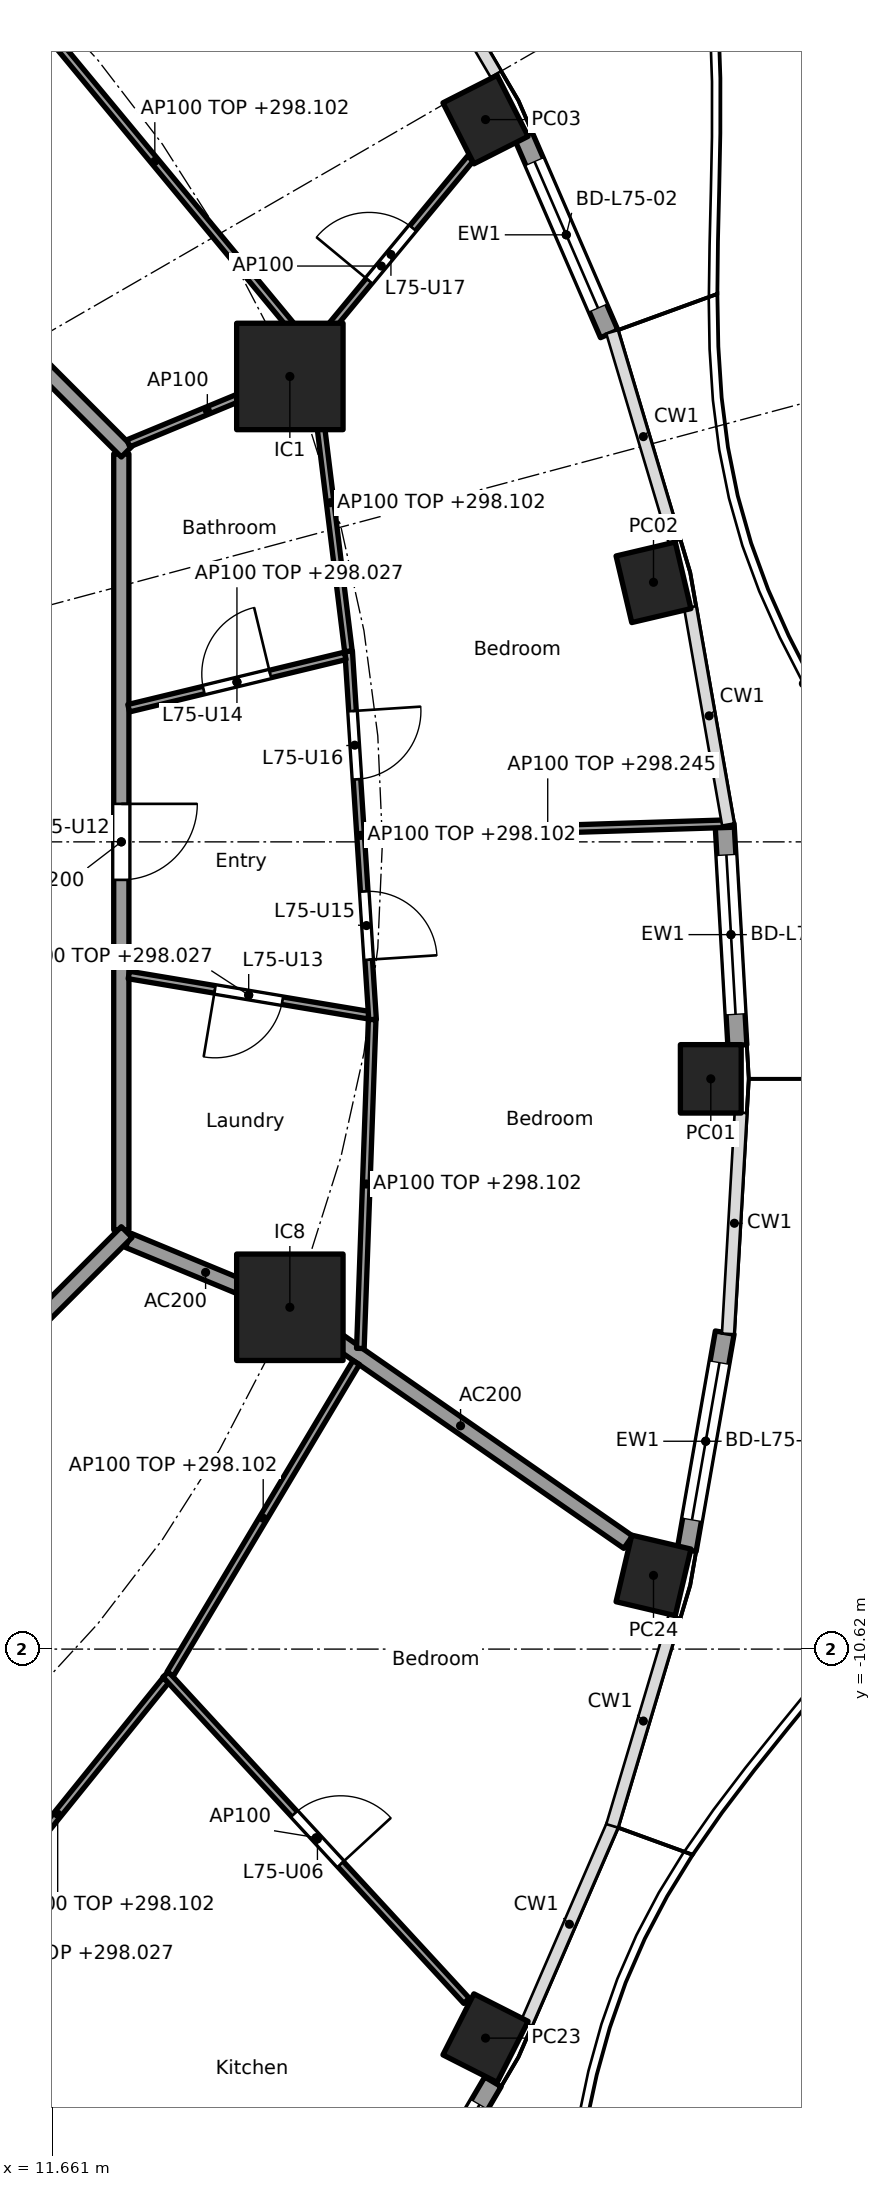
"""IFC4 building model, lengths in metres.
Left out: names, types, materials, properties, quantities, classifications, styles, units other than length and angle.
Written with IfcOpenShell. Run it as: python <this file> out.ifc"""

import sys

from ifc_helpers import new_model, si_unit, direction, frame, frame_2d, origin, origin_2d, place, context, subcontext, project, spatial, rectangle, hollow_rectangle, extrude, element, fill, save


model = new_model("IFC4")
c1 = context("Model", 3, precision=1e-05, world=origin(), true_north=direction((0.0, 1.0)))
c2 = subcontext(c1, "Body", "Model", "MODEL_VIEW")
j1 = project(units=[si_unit("LENGTHUNIT", "METRE"), si_unit("PLANEANGLEUNIT", "RADIAN")], contexts=[c1])
p1 = place(None, origin())
s1 = spatial("IfcSite", under=j1, at=p1, CompositionType="ELEMENT")
p2 = place(p1, origin())
s2 = spatial("IfcBuilding", under=s1, at=p2, CompositionType="ELEMENT")
p3 = place(p2, frame((0.0, 0.0, 295.5)))
s3 = spatial("IfcBuildingStorey", under=s2, at=p3, CompositionType="ELEMENT", Elevation=295.5)
for number, where, z_axis, x_axis in (
    (1, (20.32, -3.118, 0.0), (0.0, 0.0, 1.0), (0.0, 1.0, 0.0)),
    (2, (19.566, 3.415, 0.0), (0.0, 0.0, 1.0), (-0.229, 0.973, 0.0)),
    (3, (17.356, 9.502, 0.0), (0.0, 0.0, 1.0), (-0.452, 0.892, 0.0)),
    (4, (17.356, -15.738, 0.0), (0.0, 0.0, 1.0), (0.452, 0.892, 0.0)),
    (5, (19.566, -9.65, 0.0), (0.0, 0.0, 1.0), (0.229, 0.973, 0.0)),
):
    element("IfcColumn", number, at=place(p3, frame(where, z_axis=z_axis, x_axis=x_axis)), inside=s3, PredefinedType="COLUMN", context=c2, shape_type="SweptSolid", body=[
        extrude(hollow_rectangle(XDim=0.9, YDim=0.8, WallThickness=0.028, at=origin_2d()), origin(), (0.0, 0.0, 1.0), 3.7),
    ])
for number, where, z_axis, x_axis in (
    (6, (14.782, 6.123, 0.0), (0.0, 0.0, 1.0), (1.0, 0.0, 0.0)),
    (7, (14.782, -6.123, 0.0), (0.0, 0.0, 1.0), (1.0, 0.0, 0.0)),
):
    element("IfcColumn", number, at=place(p3, frame(where, z_axis=z_axis, x_axis=x_axis)), inside=s3, PredefinedType="COLUMN", context=c2, shape_type="SweptSolid", body=[
        extrude(rectangle(XDim=1.4, YDim=1.4, at=origin_2d()), origin(), (0.0, 0.0, 1.0), 3.7),
    ])
p4 = place(p3, frame((20.502, 0.235, 0.0), z_axis=(0.0, 0.0, 1.0), x_axis=(0.057533933376, -0.998343551344, 0.0)))
e8 = element("IfcWall", 8, at=p4, inside=s3, PredefinedType="SOLIDWALL", context=c2, shape_type="SweptSolid", body=[
    extrude(rectangle(XDim=2.915, YDim=0.25, at=frame_2d((1.458, 0.0))), origin(), (0.0, 0.0, 1.0), 3.28),
])
p5 = place(p4, frame((0.408, 0.0, 0.0)))
e9 = element("IfcOpeningElement", 9, at=p5, cuts=e8, PredefinedType="OPENING", context=c2, shape_type="SweptSolid", body=[
    extrude(rectangle(XDim=2.1, YDim=2.4, at=frame_2d((1.05, 1.2))), frame((0.0, 0.135, 0.0), z_axis=(0.0, -1.0, 0.0), x_axis=(1.0, 0.0, 0.0)), (0.0, 0.0, 1.0), 0.27),
])
p6 = place(p3, frame((17.854, 9.29, 0.0), z_axis=(0.0, 0.0, 1.0), x_axis=(0.397597791596, -0.9175598052, 0.0)))
e10 = element("IfcWall", 10, at=p6, inside=s3, PredefinedType="SOLIDWALL", context=c2, shape_type="SweptSolid", body=[
    extrude(rectangle(XDim=2.841, YDim=0.25, at=frame_2d((1.42, 0.0))), origin(), (0.0, 0.0, 1.0), 3.28),
])
p7 = place(p6, frame((0.371, 0.0, 0.0)))
e11 = element("IfcOpeningElement", 11, at=p7, cuts=e10, PredefinedType="OPENING", context=c2, shape_type="SweptSolid", body=[
    extrude(rectangle(XDim=2.1, YDim=2.4, at=frame_2d((1.05, 1.2))), frame((0.0, 0.135, 0.0), z_axis=(0.0, -1.0, 0.0), x_axis=(1.0, 0.0, 0.0)), (0.0, 0.0, 1.0), 0.27),
])
p8 = place(p3, frame((17.454, -16.312, 0.0), z_axis=(0.0, 0.0, 1.0), x_axis=(-0.506371364425, -0.862315511452, 0.0)))
e12 = element("IfcWall", 12, at=p8, inside=s3, PredefinedType="SOLIDWALL", context=c2, shape_type="SweptSolid", body=[
    extrude(rectangle(XDim=2.796, YDim=0.25, at=frame_2d((1.398, 0.0))), origin(), (0.0, 0.0, 1.0), 3.28),
])
p9 = place(p8, frame((0.348, 0.0, 0.0)))
e13 = element("IfcOpeningElement", 13, at=p9, cuts=e12, PredefinedType="OPENING", context=c2, shape_type="SweptSolid", body=[
    extrude(rectangle(XDim=2.1, YDim=2.4, at=frame_2d((1.05, 1.2))), frame((0.0, 0.135, 0.0), z_axis=(0.0, -1.0, 0.0), x_axis=(1.0, 0.0, 0.0)), (0.0, 0.0, 1.0), 0.27),
])
p10 = place(p3, frame((20.503, -6.456, 0.0), z_axis=(0.0, 0.0, 1.0), x_axis=(-0.172182411767, -0.985065082661, 0.0)))
e14 = element("IfcWall", 14, at=p10, inside=s3, PredefinedType="SOLIDWALL", context=c2, shape_type="SweptSolid", body=[
    extrude(rectangle(XDim=2.903, YDim=0.25, at=frame_2d((1.451, 0.0))), origin(), (0.0, 0.0, 1.0), 3.28),
])
p11 = place(p10, frame((0.401, 0.0, 0.0)))
e15 = element("IfcOpeningElement", 15, at=p11, cuts=e14, PredefinedType="OPENING", context=c2, shape_type="SweptSolid", body=[
    extrude(rectangle(XDim=2.1, YDim=2.4, at=frame_2d((1.05, 1.2))), frame((0.0, 0.135, 0.0), z_axis=(0.0, -1.0, 0.0), x_axis=(1.0, 0.0, 0.0)), (0.0, 0.0, 1.0), 0.27),
])
p12 = place(p3, frame((12.657, -5.243, 0.0), z_axis=(0.0, 0.0, 1.0), x_axis=(0.92383017907, -0.382802560388, 0.0)))
e16 = element("IfcWall", 16, at=p12, inside=s3, PredefinedType="PARTITIONING", context=c2, shape_type="SweptSolid", body=[
    extrude(rectangle(XDim=2.2, YDim=0.2, at=frame_2d((1.1, 0.0))), origin(), (0.0, 0.0, 1.0), 3.28),
])
p13 = place(p3, frame((14.823, -6.151, 0.0), z_axis=(0.0, 0.0, 1.0), x_axis=(0.821435065081, -0.570302054928, 0.0)))
e17 = element("IfcWall", 17, at=p13, inside=s3, PredefinedType="PARTITIONING", context=c2, shape_type="SweptSolid", body=[
    extrude(rectangle(XDim=5.368, YDim=0.2, at=frame_2d((2.684, 0.0))), origin(), (0.0, 0.0, 1.0), 3.28),
])
p14 = place(p3, frame((12.565, -5.104, 0.0), z_axis=(0.0, 0.0, 1.0), x_axis=(0.0, 1.0, 0.0)))
e18 = element("IfcWall", 18, at=p14, inside=s3, PredefinedType="PARTITIONING", context=c2, shape_type="SweptSolid", body=[
    extrude(rectangle(XDim=10.209, YDim=0.2, at=frame_2d((5.104, 0.0))), origin(), (0.0, 0.0, 1.0), 3.28),
])
p15 = place(p14, frame((4.604, 0.0, 0.0)))
e19 = element("IfcOpeningElement", 19, at=p15, cuts=e18, PredefinedType="OPENING", context=c2, shape_type="SweptSolid", body=[
    extrude(rectangle(XDim=1.0, YDim=2.1, at=frame_2d((0.5, 1.05))), frame((0.0, 0.11, 0.0), z_axis=(0.0, -1.0, 0.0), x_axis=(1.0, 0.0, 0.0)), (0.0, 0.0, 1.0), 0.22),
])
p16 = place(p3, frame((12.635, 5.134, 0.0), z_axis=(0.0, 0.0, 1.0), x_axis=(-0.707106781187, 0.707106781187, 0.0)))
e20 = element("IfcWall", 20, at=p16, inside=s3, PredefinedType="PARTITIONING", context=c2, shape_type="SweptSolid", body=[
    extrude(rectangle(XDim=10.609, YDim=0.2, at=frame_2d((5.305, 0.0))), origin(), (0.0, 0.0, 1.0), 3.28),
])
p17 = place(p3, frame((5.275, -12.494, 0.0), z_axis=(0.0, 0.0, 1.0), x_axis=(0.707106781187, 0.707106781187, 0.0)))
e21 = element("IfcWall", 21, at=p17, inside=s3, PredefinedType="PARTITIONING", context=c2, shape_type="SweptSolid", body=[
    extrude(rectangle(XDim=10.409, YDim=0.2, at=frame_2d((5.205, 0.0))), origin(), (0.0, 0.0, 1.0), 3.28),
])
p18 = place(p17, frame((1.185, 0.0, 0.0)))
e22 = element("IfcOpeningElement", 22, at=p18, cuts=e21, PredefinedType="OPENING", context=c2, shape_type="SweptSolid", body=[
    extrude(rectangle(XDim=1.0, YDim=2.1, at=frame_2d((0.5, 1.05))), frame((0.0, 0.11, 0.0), z_axis=(0.0, -1.0, 0.0), x_axis=(1.0, 0.0, 0.0)), (0.0, 0.0, 1.0), 0.22),
])
p19 = place(p3, frame((12.663, -1.751, 0.0), z_axis=(0.0, 0.0, 1.0), x_axis=(0.98626156497, -0.165191178529, 0.0)))
e23 = element("IfcWall", 23, at=p19, inside=s3, PredefinedType="PARTITIONING", context=c2, shape_type="SweptSolid", body=[
    extrude(rectangle(XDim=3.198, YDim=0.1, at=frame_2d((1.599, 0.0))), origin(), (0.0, 0.0, 1.0), 2.527),
])
p20 = place(p19, frame((1.149, 0.0, 0.0)))
e24 = element("IfcOpeningElement", 24, at=p20, cuts=e23, PredefinedType="OPENING", context=c2, shape_type="SweptSolid", body=[
    extrude(rectangle(XDim=0.9, YDim=2.1, at=frame_2d((0.45, 1.05))), frame((0.0, 0.06, 0.0), z_axis=(0.0, -1.0, 0.0), x_axis=(1.0, 0.0, 0.0)), (0.0, 0.0, 1.0), 0.12),
])
p21 = place(p3, frame((15.87, -2.338, 0.0), z_axis=(0.0, 0.0, 1.0), x_axis=(-0.064797294757, 0.997898447034, 0.0)))
e25 = element("IfcWall", 25, at=p21, inside=s3, PredefinedType="PARTITIONING", context=c2, shape_type="SweptSolid", body=[
    extrude(rectangle(XDim=4.857, YDim=0.1, at=frame_2d((2.428, 0.0))), origin(), (0.0, 0.0, 1.0), 2.602),
])
p22 = place(p21, frame((0.789, 0.0, 0.0)))
e26 = element("IfcOpeningElement", 26, at=p22, cuts=e25, PredefinedType="OPENING", context=c2, shape_type="SweptSolid", body=[
    extrude(rectangle(XDim=0.9, YDim=2.1, at=frame_2d((0.45, 1.05))), frame((0.0, 0.06, 0.0), z_axis=(0.0, -1.0, 0.0), x_axis=(1.0, 0.0, 0.0)), (0.0, 0.0, 1.0), 0.12),
])
p23 = place(p21, frame((3.167, 0.0, 0.0)))
e27 = element("IfcOpeningElement", 27, at=p23, cuts=e25, PredefinedType="OPENING", context=c2, shape_type="SweptSolid", body=[
    extrude(rectangle(XDim=0.9, YDim=2.1, at=frame_2d((0.45, 1.05))), frame((0.0, 0.06, 0.0), z_axis=(0.0, -1.0, 0.0), x_axis=(1.0, 0.0, 0.0)), (0.0, 0.0, 1.0), 0.12),
])
p24 = place(p3, frame((15.865, -2.338, 0.0), z_axis=(0.0, 0.0, 1.0), x_axis=(-0.035864509465, -0.999356661538, 0.0)))
e28 = element("IfcWall", 28, at=p24, inside=s3, PredefinedType="PARTITIONING", context=c2, shape_type="SweptSolid", body=[
    extrude(rectangle(XDim=4.329, YDim=0.1, at=frame_2d((2.165, 0.0))), origin(), (0.0, 0.0, 1.0), 2.602),
])
p25 = place(p3, frame((15.763, 0.087, 0.0), z_axis=(0.0, 0.0, 1.0), x_axis=(0.999492034598, 0.03186962151, 0.0)))
e29 = element("IfcWall", 29, at=p25, inside=s3, PredefinedType="PARTITIONING", context=c2, shape_type="SweptSolid", body=[
    extrude(rectangle(XDim=4.826, YDim=0.1, at=frame_2d((2.413, 0.0))), origin(), (0.0, 0.0, 1.0), 2.745),
])
p26 = place(p3, frame((12.662, 1.758, 0.0), z_axis=(0.0, 0.0, 1.0), x_axis=(0.972004827836, 0.234960879007, 0.0)))
e30 = element("IfcWall", 30, at=p26, inside=s3, PredefinedType="PARTITIONING", context=c2, shape_type="SweptSolid", body=[
    extrude(rectangle(XDim=2.93, YDim=0.1, at=frame_2d((1.465, 0.0))), origin(), (0.0, 0.0, 1.0), 2.527),
])
p27 = place(p26, frame((1.015, 0.0, 0.0)))
e31 = element("IfcOpeningElement", 31, at=p27, cuts=e30, PredefinedType="OPENING", context=c2, shape_type="SweptSolid", body=[
    extrude(rectangle(XDim=0.9, YDim=2.1, at=frame_2d((0.45, 1.05))), frame((0.0, 0.06, 0.0), z_axis=(0.0, -1.0, 0.0), x_axis=(1.0, 0.0, 0.0)), (0.0, 0.0, 1.0), 0.12),
])
p28 = place(p3, frame((15.552, 2.508, 0.0), z_axis=(0.0, 0.0, 1.0), x_axis=(-0.12196631785, 0.992534239868, 0.0)))
e32 = element("IfcWall", 32, at=p28, inside=s3, PredefinedType="PARTITIONING", context=c2, shape_type="SweptSolid", body=[
    extrude(rectangle(XDim=3.937, YDim=0.1, at=frame_2d((1.969, 0.0))), origin(), (0.0, 0.0, 1.0), 2.602),
])
p29 = place(p3, frame((12.657, 5.243, 0.0), z_axis=(0.0, 0.0, 1.0), x_axis=(0.923864733477, 0.382719158442, 0.0)))
e33 = element("IfcWall", 33, at=p29, inside=s3, PredefinedType="PARTITIONING", context=c2, shape_type="SweptSolid", body=[
    extrude(rectangle(XDim=2.25, YDim=0.1, at=frame_2d((1.125, 0.0))), origin(), (0.0, 0.0, 1.0), 3.28),
])
p30 = place(p3, frame((14.814, 6.161, 0.0), z_axis=(0.0, 0.0, 1.0), x_axis=(0.638050520313, 0.769994502272, 0.0)))
e34 = element("IfcWall", 34, at=p30, inside=s3, PredefinedType="PARTITIONING", context=c2, shape_type="SweptSolid", body=[
    extrude(rectangle(XDim=3.673, YDim=0.1, at=frame_2d((1.836, 0.0))), origin(), (0.0, 0.0, 1.0), 3.28),
])
p31 = place(p30, frame((1.584, 0.0, 0.0)))
e35 = element("IfcOpeningElement", 35, at=p31, cuts=e34, PredefinedType="OPENING", context=c2, shape_type="SweptSolid", body=[
    extrude(rectangle(XDim=0.9, YDim=2.1, at=frame_2d((0.45, 1.05))), frame((0.0, 0.06, 0.0), z_axis=(0.0, -1.0, 0.0), x_axis=(1.0, 0.0, 0.0)), (0.0, 0.0, 1.0), 0.12),
])
p32 = place(p3, frame((15.034, 6.504, 0.0), z_axis=(0.0, 0.0, 1.0), x_axis=(-0.637935278767, 0.770089981823, 0.0)))
e36 = element("IfcWall", 36, at=p32, inside=s3, PredefinedType="PARTITIONING", context=c2, shape_type="SweptSolid", body=[
    extrude(rectangle(XDim=6.361, YDim=0.1, at=frame_2d((3.18, 0.0))), origin(), (0.0, 0.0, 1.0), 2.602),
])
p33 = place(p3, frame((7.708, -10.198, 0.0), z_axis=(0.0, 0.0, 1.0), x_axis=(0.503839015963, -0.863797572347, 0.0)))
e37 = element("IfcWall", 37, at=p33, inside=s3, PredefinedType="PARTITIONING", context=c2, shape_type="SweptSolid", body=[
    extrude(rectangle(XDim=11.856, YDim=0.1, at=frame_2d((5.928, 0.0))), origin(), (0.0, 0.0, 1.0), 2.527),
])
p34 = place(p33, frame((2.095, 0.0, 0.0)))
e38 = element("IfcOpeningElement", 38, at=p34, cuts=e37, PredefinedType="OPENING", context=c2, shape_type="SweptSolid", body=[
    extrude(rectangle(XDim=0.9, YDim=2.1, at=frame_2d((0.45, 1.05))), frame((0.0, 0.06, 0.0), z_axis=(0.0, -1.0, 0.0), x_axis=(1.0, 0.0, 0.0)), (0.0, 0.0, 1.0), 0.12),
])
p35 = place(p33, frame((8.023, 0.0, 0.0)))
e39 = element("IfcOpeningElement", 39, at=p35, cuts=e37, PredefinedType="OPENING", context=c2, shape_type="SweptSolid", body=[
    extrude(rectangle(XDim=0.9, YDim=2.1, at=frame_2d((0.45, 1.05))), frame((0.0, 0.06, 0.0), z_axis=(0.0, -1.0, 0.0), x_axis=(1.0, 0.0, 0.0)), (0.0, 0.0, 1.0), 0.12),
])
p36 = place(p3, frame((10.304, -14.555, 0.0), z_axis=(0.0, 0.0, 1.0), x_axis=(0.628170338674, 0.778075848237, 0.0)))
e40 = element("IfcWall", 40, at=p36, inside=s3, PredefinedType="PARTITIONING", context=c2, shape_type="SweptSolid", body=[
    extrude(rectangle(XDim=4.532, YDim=0.1, at=frame_2d((2.266, 0.0))), origin(), (0.0, 0.0, 1.0), 2.602),
])
p37 = place(p3, frame((13.149, -10.953, 0.0), z_axis=(0.0, 0.0, 1.0), x_axis=(0.677762562884, -0.735280836384, 0.0)))
e41 = element("IfcWall", 41, at=p37, inside=s3, PredefinedType="PARTITIONING", context=c2, shape_type="SweptSolid", body=[
    extrude(rectangle(XDim=5.841, YDim=0.1, at=frame_2d((2.92, 0.0))), origin(), (0.0, 0.0, 1.0), 3.28),
])
p38 = place(p37, frame((2.495, 0.0, 0.0)))
e42 = element("IfcOpeningElement", 42, at=p38, cuts=e41, PredefinedType="OPENING", context=c2, shape_type="SweptSolid", body=[
    extrude(rectangle(XDim=0.9, YDim=2.1, at=frame_2d((0.45, 1.05))), frame((0.0, 0.06, 0.0), z_axis=(0.0, -1.0, 0.0), x_axis=(1.0, 0.0, 0.0)), (0.0, 0.0, 1.0), 0.12),
])
p39 = place(p3, frame((13.208, -10.947, 0.0), z_axis=(0.0, 0.0, 1.0), x_axis=(0.512726452516, 0.858552028063, 0.0)))
e43 = element("IfcWall", 43, at=p39, inside=s3, PredefinedType="PARTITIONING", context=c2, shape_type="SweptSolid", body=[
    extrude(rectangle(XDim=4.772, YDim=0.1, at=frame_2d((2.386, 0.0))), origin(), (0.0, 0.0, 1.0), 2.602),
])
p40 = place(p5, origin())
e44 = element("IfcDoor", 44, at=p40, inside=s3, OperationType="SLIDING_TO_LEFT", PredefinedType="DOOR", context=c2, shape_type="SweptSolid", body=[
    extrude(rectangle(XDim=2.1, YDim=2.4, at=frame_2d((1.05, 1.2))), frame((0.0, 0.025, 0.0), z_axis=(0.0, -1.0, 0.0), x_axis=(1.0, 0.0, 0.0)), (0.0, 0.0, 1.0), 0.05),
])
fill(e9, e44)
p41 = place(p7, origin())
e45 = element("IfcDoor", 45, at=p41, inside=s3, OperationType="SLIDING_TO_LEFT", PredefinedType="DOOR", context=c2, shape_type="SweptSolid", body=[
    extrude(rectangle(XDim=2.1, YDim=2.4, at=frame_2d((1.05, 1.2))), frame((0.0, 0.025, 0.0), z_axis=(0.0, -1.0, 0.0), x_axis=(1.0, 0.0, 0.0)), (0.0, 0.0, 1.0), 0.05),
])
fill(e11, e45)
p42 = place(p9, origin())
e46 = element("IfcDoor", 46, at=p42, inside=s3, OperationType="SLIDING_TO_LEFT", PredefinedType="DOOR", context=c2, shape_type="SweptSolid", body=[
    extrude(rectangle(XDim=2.1, YDim=2.4, at=frame_2d((1.05, 1.2))), frame((0.0, 0.025, 0.0), z_axis=(0.0, -1.0, 0.0), x_axis=(1.0, 0.0, 0.0)), (0.0, 0.0, 1.0), 0.05),
])
fill(e13, e46)
p43 = place(p11, origin())
e47 = element("IfcDoor", 47, at=p43, inside=s3, OperationType="SLIDING_TO_LEFT", PredefinedType="DOOR", context=c2, shape_type="SweptSolid", body=[
    extrude(rectangle(XDim=2.1, YDim=2.4, at=frame_2d((1.05, 1.2))), frame((0.0, 0.025, 0.0), z_axis=(0.0, -1.0, 0.0), x_axis=(1.0, 0.0, 0.0)), (0.0, 0.0, 1.0), 0.05),
])
fill(e15, e47)
p44 = place(p38, origin())
e48 = element("IfcDoor", 48, at=p44, inside=s3, OperationType="SINGLE_SWING_RIGHT", PredefinedType="DOOR", context=c2, shape_type="SweptSolid", body=[
    extrude(rectangle(XDim=0.9, YDim=2.1, at=frame_2d((0.45, 1.05))), frame((0.0, 0.025, 0.0), z_axis=(0.0, -1.0, 0.0), x_axis=(1.0, 0.0, 0.0)), (0.0, 0.0, 1.0), 0.05),
])
fill(e42, e48)
p45 = place(p15, frame((1.0, 0.0, 0.0), x_axis=(-1.0, 0.0, 0.0)))
e49 = element("IfcDoor", 49, at=p45, inside=s3, OperationType="SINGLE_SWING_LEFT", PredefinedType="DOOR", context=c2, shape_type="SweptSolid", body=[
    extrude(rectangle(XDim=1.0, YDim=2.1, at=frame_2d((0.5, 1.05))), frame((0.0, 0.025, 0.0), z_axis=(0.0, -1.0, 0.0), x_axis=(1.0, 0.0, 0.0)), (0.0, 0.0, 1.0), 0.05),
])
fill(e19, e49)
p46 = place(p20, frame((0.9, 0.0, 0.0), x_axis=(-1.0, 0.0, 0.0)))
e50 = element("IfcDoor", 50, at=p46, inside=s3, OperationType="SINGLE_SWING_RIGHT", PredefinedType="DOOR", context=c2, shape_type="SweptSolid", body=[
    extrude(rectangle(XDim=0.9, YDim=2.1, at=frame_2d((0.45, 1.05))), frame((0.0, 0.025, 0.0), z_axis=(0.0, -1.0, 0.0), x_axis=(1.0, 0.0, 0.0)), (0.0, 0.0, 1.0), 0.05),
])
fill(e24, e50)
p47 = place(p27, origin())
e51 = element("IfcDoor", 51, at=p47, inside=s3, OperationType="SINGLE_SWING_RIGHT", PredefinedType="DOOR", context=c2, shape_type="SweptSolid", body=[
    extrude(rectangle(XDim=0.9, YDim=2.1, at=frame_2d((0.45, 1.05))), frame((0.0, 0.025, 0.0), z_axis=(0.0, -1.0, 0.0), x_axis=(1.0, 0.0, 0.0)), (0.0, 0.0, 1.0), 0.05),
])
fill(e31, e51)
p48 = place(p22, frame((0.9, 0.0, 0.0), x_axis=(-1.0, 0.0, 0.0)))
e52 = element("IfcDoor", 52, at=p48, inside=s3, OperationType="SINGLE_SWING_RIGHT", PredefinedType="DOOR", context=c2, shape_type="SweptSolid", body=[
    extrude(rectangle(XDim=0.9, YDim=2.1, at=frame_2d((0.45, 1.05))), frame((0.0, 0.025, 0.0), z_axis=(0.0, -1.0, 0.0), x_axis=(1.0, 0.0, 0.0)), (0.0, 0.0, 1.0), 0.05),
])
fill(e26, e52)
p49 = place(p23, frame((0.9, 0.0, 0.0), x_axis=(-1.0, 0.0, 0.0)))
e53 = element("IfcDoor", 53, at=p49, inside=s3, OperationType="SINGLE_SWING_LEFT", PredefinedType="DOOR", context=c2, shape_type="SweptSolid", body=[
    extrude(rectangle(XDim=0.9, YDim=2.1, at=frame_2d((0.45, 1.05))), frame((0.0, 0.025, 0.0), z_axis=(0.0, -1.0, 0.0), x_axis=(1.0, 0.0, 0.0)), (0.0, 0.0, 1.0), 0.05),
])
fill(e27, e53)
p50 = place(p31, origin())
e54 = element("IfcDoor", 54, at=p50, inside=s3, OperationType="SINGLE_SWING_LEFT", PredefinedType="DOOR", context=c2, shape_type="SweptSolid", body=[
    extrude(rectangle(XDim=0.9, YDim=2.1, at=frame_2d((0.45, 1.05))), frame((0.0, 0.025, 0.0), z_axis=(0.0, -1.0, 0.0), x_axis=(1.0, 0.0, 0.0)), (0.0, 0.0, 1.0), 0.05),
])
fill(e35, e54)
save(model, sys.argv[1])
